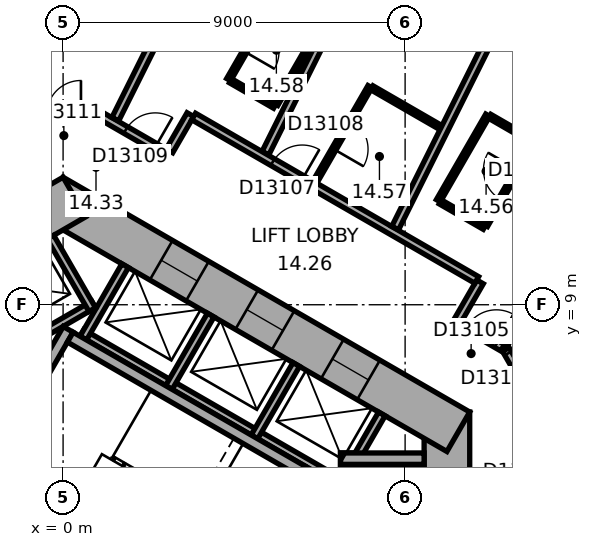
"""IFC4 building model, lengths in metres.
Left out: names, types, materials, properties, quantities, classifications, styles, units other than length and angle.
Written with IfcOpenShell. Run it as: python <this file> out.ifc"""

import sys

from ifc_helpers import new_model, si_unit, direction, frame, frame_2d, origin, place, context, subcontext, project, spatial, rectangle, extrude, element, fill, save


model = new_model("IFC4")
c1 = context("Model", 3, precision=1e-05, world=origin(), true_north=direction((0.0, 1.0)))
c2 = subcontext(c1, "Body", "Model", "MODEL_VIEW")
j1 = project(units=[si_unit("LENGTHUNIT", "METRE"), si_unit("PLANEANGLEUNIT", "RADIAN")], contexts=[c1])
p1 = place(None, origin())
s1 = spatial("IfcSite", under=j1, at=p1, CompositionType="ELEMENT")
p2 = place(p1, origin())
s2 = spatial("IfcBuilding", under=s1, at=p2, CompositionType="ELEMENT")
p3 = place(p2, frame((0.0, 0.0, 67.1)))
s3 = spatial("IfcBuildingStorey", under=s2, at=p3, CompositionType="ELEMENT", Elevation=67.1)
p4 = place(p3, frame((10.1, -6.177, 0.0), z_axis=(0.0, 0.0, 1.0), x_axis=(0.0, 1.0, 0.0)))
e1 = element("IfcWall", 1, at=p4, inside=s3, PredefinedType="SHEAR", context=c2, shape_type="SweptSolid", body=[
    extrude(rectangle(XDim=12.355, YDim=1.2, at=frame_2d((6.177, 0.0))), origin(), (0.0, 0.0, 1.0), 3.3),
])
p5 = place(p4, frame((6.378, 0.0, 0.0)))
e2 = element("IfcOpeningElement", 2, at=p5, cuts=e1, PredefinedType="OPENING", context=c2, shape_type="SweptSolid", body=[
    extrude(rectangle(XDim=1.5, YDim=2.1, at=frame_2d((0.75, 1.05))), frame((0.0, 0.61, 0.0), z_axis=(0.0, -1.0, 0.0), x_axis=(1.0, 0.0, 0.0)), (0.0, 0.0, 1.0), 1.22),
])
p6 = place(p4, frame((1.828, 0.0, 0.0)))
e3 = element("IfcOpeningElement", 3, at=p6, cuts=e1, PredefinedType="OPENING", context=c2, shape_type="SweptSolid", body=[
    extrude(rectangle(XDim=1.1, YDim=2.1, at=frame_2d((0.55, 1.05))), frame((0.0, 0.61, 0.0), z_axis=(0.0, -1.0, 0.0), x_axis=(1.0, 0.0, 0.0)), (0.0, 0.0, 1.0), 1.22),
])
p7 = place(p4, frame((4.427, 0.0, 0.0)))
e4 = element("IfcOpeningElement", 4, at=p7, cuts=e1, PredefinedType="OPENING", context=c2, shape_type="SweptSolid", body=[
    extrude(rectangle(XDim=1.1, YDim=2.1, at=frame_2d((0.55, 1.05))), frame((0.0, 0.61, 0.0), z_axis=(0.0, -1.0, 0.0), x_axis=(1.0, 0.0, 0.0)), (0.0, 0.0, 1.0), 1.22),
])
p8 = place(p3, frame((10.4, 5.658, 0.0), z_axis=(0.0, 0.0, 1.0), x_axis=(-0.866021384402, 0.500006961711, 0.0)))
e5 = element("IfcWall", 5, at=p8, inside=s3, PredefinedType="SHEAR", context=c2, shape_type="SweptSolid", body=[
    extrude(rectangle(XDim=12.355, YDim=1.2, at=frame_2d((6.178, 0.0))), origin(), (0.0, 0.0, 1.0), 3.3),
])
p9 = place(p8, frame((2.728, 0.0, 0.0)))
e6 = element("IfcOpeningElement", 6, at=p9, cuts=e5, PredefinedType="OPENING", context=c2, shape_type="SweptSolid", body=[
    extrude(rectangle(XDim=1.1, YDim=2.1, at=frame_2d((0.55, 1.05))), frame((0.0, 0.61, 0.0), z_axis=(0.0, -1.0, 0.0), x_axis=(1.0, 0.0, 0.0)), (0.0, 0.0, 1.0), 1.22),
])
p10 = place(p8, frame((5.328, 0.0, 0.0)))
e7 = element("IfcOpeningElement", 7, at=p10, cuts=e5, PredefinedType="OPENING", context=c2, shape_type="SweptSolid", body=[
    extrude(rectangle(XDim=1.1, YDim=2.1, at=frame_2d((0.55, 1.05))), frame((0.0, 0.61, 0.0), z_axis=(0.0, -1.0, 0.0), x_axis=(1.0, 0.0, 0.0)), (0.0, 0.0, 1.0), 1.22),
])
p11 = place(p8, frame((7.928, 0.0, 0.0)))
e8 = element("IfcOpeningElement", 8, at=p11, cuts=e5, PredefinedType="OPENING", context=c2, shape_type="SweptSolid", body=[
    extrude(rectangle(XDim=1.1, YDim=2.1, at=frame_2d((0.55, 1.05))), frame((0.0, 0.61, 0.0), z_axis=(0.0, -1.0, 0.0), x_axis=(1.0, 0.0, 0.0)), (0.0, 0.0, 1.0), 1.22),
])
p12 = place(p3, frame((0.3, 11.836, 0.0), z_axis=(0.0, 0.0, 1.0), x_axis=(-0.866021384402, -0.500006961711, 0.0)))
e9 = element("IfcWall", 9, at=p12, inside=s3, PredefinedType="SHEAR", context=c2, shape_type="SweptSolid", body=[
    extrude(rectangle(XDim=12.355, YDim=1.2, at=frame_2d((6.178, 0.0))), origin(), (0.0, 0.0, 1.0), 3.3),
])
p13 = place(p12, frame((6.378, 0.0, 0.0)))
e10 = element("IfcOpeningElement", 10, at=p13, cuts=e9, PredefinedType="OPENING", context=c2, shape_type="SweptSolid", body=[
    extrude(rectangle(XDim=1.5, YDim=2.1, at=frame_2d((0.75, 1.05))), frame((0.0, 0.61, 0.0), z_axis=(0.0, -1.0, 0.0), x_axis=(1.0, 0.0, 0.0)), (0.0, 0.0, 1.0), 1.22),
])
p14 = place(p12, frame((1.828, 0.0, 0.0)))
e11 = element("IfcOpeningElement", 11, at=p14, cuts=e9, PredefinedType="OPENING", context=c2, shape_type="SweptSolid", body=[
    extrude(rectangle(XDim=1.1, YDim=2.1, at=frame_2d((0.55, 1.05))), frame((0.0, 0.61, 0.0), z_axis=(0.0, -1.0, 0.0), x_axis=(1.0, 0.0, 0.0)), (0.0, 0.0, 1.0), 1.22),
])
p15 = place(p3, frame((20.63, 15.47, 0.0), z_axis=(0.0, 0.0, 1.0), x_axis=(-0.894934518609, 0.446197498203, 0.0)))
e12 = element("IfcWall", 12, at=p15, inside=s3, PredefinedType="STANDARD", context=c2, shape_type="SweptSolid", body=[
    extrude(rectangle(XDim=21.246, YDim=0.2, at=frame_2d((10.623, 0.0))), origin(), (0.0, 0.0, 1.0), 3.3),
])
p16 = place(p15, frame((1.553, 0.0, 0.8)))
e13 = element("IfcOpeningElement", 13, at=p16, cuts=e12, PredefinedType="OPENING", context=c2, shape_type="SweptSolid", body=[
    extrude(rectangle(XDim=2.4, YDim=1.7, at=frame_2d((1.2, 0.85))), frame((0.0, 0.11, 0.0), z_axis=(0.0, -1.0, 0.0), x_axis=(1.0, 0.0, 0.0)), (0.0, 0.0, 1.0), 0.22),
])
p17 = place(p15, frame((5.488, 0.0, 0.8)))
e14 = element("IfcOpeningElement", 14, at=p17, cuts=e12, PredefinedType="OPENING", context=c2, shape_type="SweptSolid", body=[
    extrude(rectangle(XDim=2.4, YDim=1.7, at=frame_2d((1.2, 0.85))), frame((0.0, 0.11, 0.0), z_axis=(0.0, -1.0, 0.0), x_axis=(1.0, 0.0, 0.0)), (0.0, 0.0, 1.0), 0.22),
])
p18 = place(p15, frame((9.422, 0.0, 0.8)))
e15 = element("IfcOpeningElement", 15, at=p18, cuts=e12, PredefinedType="OPENING", context=c2, shape_type="SweptSolid", body=[
    extrude(rectangle(XDim=2.4, YDim=1.7, at=frame_2d((1.2, 0.85))), frame((0.0, 0.11, 0.0), z_axis=(0.0, -1.0, 0.0), x_axis=(1.0, 0.0, 0.0)), (0.0, 0.0, 1.0), 0.22),
])
p19 = place(p15, frame((13.357, 0.0, 0.8)))
e16 = element("IfcOpeningElement", 16, at=p19, cuts=e12, PredefinedType="OPENING", context=c2, shape_type="SweptSolid", body=[
    extrude(rectangle(XDim=2.4, YDim=1.7, at=frame_2d((1.2, 0.85))), frame((0.0, 0.11, 0.0), z_axis=(0.0, -1.0, 0.0), x_axis=(1.0, 0.0, 0.0)), (0.0, 0.0, 1.0), 0.22),
])
p20 = place(p15, frame((17.292, 0.0, 0.8)))
e17 = element("IfcOpeningElement", 17, at=p20, cuts=e12, PredefinedType="OPENING", context=c2, shape_type="SweptSolid", body=[
    extrude(rectangle(XDim=2.4, YDim=1.7, at=frame_2d((1.2, 0.85))), frame((0.0, 0.11, 0.0), z_axis=(0.0, -1.0, 0.0), x_axis=(1.0, 0.0, 0.0)), (0.0, 0.0, 1.0), 0.22),
])
p21 = place(p3, frame((7.424, 4.259, 0.0), z_axis=(0.0, 0.0, 1.0), x_axis=(-0.866026010844, 0.49999894854, 0.0)))
e18 = element("IfcWall", 18, at=p21, inside=s3, PredefinedType="PARTITIONING", context=c2, shape_type="SweptSolid", body=[
    extrude(rectangle(XDim=8.0, YDim=0.2, at=frame_2d((4.0, 0.0))), origin(), (0.0, 0.0, 1.0), 3.05),
])
for number, where, z_axis, x_axis in (
    (19, (7.287, 4.222, 0.0), (0.0, 0.0, 1.0), (0.5, 0.866, 0.0)),
    (20, (5.036, 5.522, 0.0), (0.0, 0.0, 1.0), (0.5, 0.866, 0.0)),
    (21, (2.784, 6.822, 0.0), (0.0, 0.0, 1.0), (0.5, 0.866, 0.0)),
    (22, (0.532, 8.122, 0.0), (0.0, 0.0, 1.0), (0.5, 0.866, 0.0)),
):
    element("IfcWall", number, at=place(p3, frame(where, z_axis=z_axis, x_axis=x_axis)), inside=s3, PredefinedType="PARTITIONING", context=c2, shape_type="SweptSolid", body=[
        extrude(rectangle(XDim=2.2, YDim=0.2, at=frame_2d((1.1, 0.0))), origin(), (0.0, 0.0, 1.0), 3.05),
    ])
p22 = place(p3, frame((0.803, 9.009, 0.0), z_axis=(0.0, 0.0, 1.0), x_axis=(-0.866028230842, -0.499995103361, 0.0)))
e23 = element("IfcWall", 23, at=p22, inside=s3, PredefinedType="PARTITIONING", context=c2, shape_type="SweptSolid", body=[
    extrude(rectangle(XDim=5.4, YDim=0.2, at=frame_2d((2.7, 0.0))), origin(), (0.0, 0.0, 1.0), 3.05),
])
p23 = place(p3, frame((0.767, 8.872, 0.0), z_axis=(0.0, 0.0, 1.0), x_axis=(-0.499994660107, 0.866028486751, 0.0)))
e24 = element("IfcWall", 24, at=p23, inside=s3, PredefinedType="PARTITIONING", context=c2, shape_type="SweptSolid", body=[
    extrude(rectangle(XDim=2.2, YDim=0.2, at=frame_2d((1.1, 0.0))), origin(), (0.0, 0.0, 1.0), 3.05),
])
p24 = place(p3, frame((4.158, 0.602, 0.0), z_axis=(0.0, 0.0, 1.0), x_axis=(0.499977259774, 0.866038532462, 0.0)))
e25 = element("IfcWall", 25, at=p24, inside=s3, PredefinedType="SHEAR", context=c2, shape_type="SweptSolid", body=[
    extrude(rectangle(XDim=4.7, YDim=0.3, at=frame_2d((2.35, 0.0))), origin(), (0.0, 0.0, 1.0), 3.05),
])
p25 = place(p24, frame((0.8, 0.0, 0.0)))
e26 = element("IfcOpeningElement", 26, at=p25, cuts=e25, PredefinedType="OPENING", context=c2, shape_type="SweptSolid", body=[
    extrude(rectangle(XDim=1.2, YDim=2.1, at=frame_2d((0.6, 1.05))), frame((0.0, 0.16, 0.0), z_axis=(0.0, -1.0, 0.0), x_axis=(1.0, 0.0, 0.0)), (0.0, 0.0, 1.0), 0.32),
])
p26 = place(p3, frame((-2.216, 4.282, 0.0), z_axis=(0.0, 0.0, 1.0), x_axis=(0.499977259774, 0.866038532462, 0.0)))
e27 = element("IfcWall", 27, at=p26, inside=s3, PredefinedType="SHEAR", context=c2, shape_type="SweptSolid", body=[
    extrude(rectangle(XDim=4.7, YDim=0.3, at=frame_2d((2.35, 0.0))), origin(), (0.0, 0.0, 1.0), 3.05),
])
p27 = place(p3, frame((6.303, 4.617, 0.0), z_axis=(0.0, 0.0, 1.0), x_axis=(-0.866027801685, 0.499995846692, 0.0)))
e28 = element("IfcWall", 28, at=p27, inside=s3, PredefinedType="SHEAR", context=c2, shape_type="SweptSolid", body=[
    extrude(rectangle(XDim=7.06, YDim=0.3, at=frame_2d((3.53, 0.0))), origin(), (0.0, 0.0, 1.0), 3.05),
])
p28 = place(p3, frame((7.45, 1.75, 0.0), z_axis=(0.0, 0.0, 1.0), x_axis=(0.0, 1.0, 0.0)))
e29 = element("IfcWall", 29, at=p28, inside=s3, PredefinedType="SHEAR", context=c2, shape_type="SweptSolid", body=[
    extrude(rectangle(XDim=3.35, YDim=0.3, at=frame_2d((1.675, 0.0))), origin(), (0.0, 0.0, 1.0), 3.05),
])
p29 = place(p3, frame((7.3, 4.95, 0.0), z_axis=(0.0, 0.0, 1.0), x_axis=(1.0, 0.0, 0.0)))
e30 = element("IfcWall", 30, at=p29, inside=s3, PredefinedType="SHEAR", context=c2, shape_type="SweptSolid", body=[
    extrude(rectangle(XDim=2.2, YDim=0.3, at=frame_2d((1.1, 0.0))), origin(), (0.0, 0.0, 1.0), 3.05),
])
p30 = place(p3, frame((0.95, 14.001, 0.0), z_axis=(0.0, 0.0, 1.0), x_axis=(-1.0, 0.0, 0.0)))
e31 = element("IfcWall", 31, at=p30, inside=s3, PredefinedType="PARTITIONING", context=c2, shape_type="SweptSolid", body=[
    extrude(rectangle(XDim=1.86, YDim=0.2, at=frame_2d((0.93, 0.0))), origin(), (0.0, 0.0, 1.0), 3.05),
])
p31 = place(p30, frame((0.48, 0.0, 0.0)))
e32 = element("IfcOpeningElement", 32, at=p31, cuts=e31, PredefinedType="OPENING", context=c2, shape_type="SweptSolid", body=[
    extrude(rectangle(XDim=0.9, YDim=2.1, at=frame_2d((0.45, 1.05))), frame((0.0, 0.11, 0.0), z_axis=(0.0, -1.0, 0.0), x_axis=(1.0, 0.0, 0.0)), (0.0, 0.0, 1.0), 0.22),
])
p32 = place(p3, frame((2.748, 12.962, 0.0), z_axis=(0.0, 0.0, 1.0), x_axis=(-0.866013897511, 0.50001992892, 0.0)))
e33 = element("IfcWall", 33, at=p32, inside=s3, PredefinedType="PARTITIONING", context=c2, shape_type="SweptSolid", body=[
    extrude(rectangle(XDim=2.037, YDim=0.2, at=frame_2d((1.018, 0.0))), origin(), (0.0, 0.0, 1.0), 3.05),
])
p33 = place(p32, frame((0.372, 0.0, 0.0)))
e34 = element("IfcOpeningElement", 34, at=p33, cuts=e33, PredefinedType="OPENING", context=c2, shape_type="SweptSolid", body=[
    extrude(rectangle(XDim=0.9, YDim=2.1, at=frame_2d((0.45, 1.05))), frame((0.0, 0.11, 0.0), z_axis=(0.0, -1.0, 0.0), x_axis=(1.0, 0.0, 0.0)), (0.0, 0.0, 1.0), 0.22),
])
p34 = place(p3, frame((3.349, 14.002, 0.0), z_axis=(0.0, 0.0, 1.0), x_axis=(-0.500074377092, -0.865982457891, 0.0)))
e35 = element("IfcWall", 35, at=p34, inside=s3, PredefinedType="PARTITIONING", context=c2, shape_type="SweptSolid", body=[
    extrude(rectangle(XDim=1.101, YDim=0.2, at=frame_2d((0.55, 0.0))), origin(), (0.0, 0.0, 1.0), 3.05),
])
p35 = place(p3, frame((4.356, 14.922, 0.0), z_axis=(0.0, 0.0, 1.0), x_axis=(0.499936506574, 0.866062058628, 0.0)))
e36 = element("IfcWall", 36, at=p35, inside=s3, PredefinedType="PARTITIONING", context=c2, shape_type="SweptSolid", body=[
    extrude(rectangle(XDim=2.6, YDim=0.12, at=frame_2d((1.3, 0.0))), origin(), (0.0, 0.0, 1.0), 3.05),
])
p36 = place(p35, frame((0.85, 0.0, 0.0)))
e37 = element("IfcOpeningElement", 37, at=p36, cuts=e36, PredefinedType="OPENING", context=c2, shape_type="SweptSolid", body=[
    extrude(rectangle(XDim=0.9, YDim=2.1, at=frame_2d((0.45, 1.05))), frame((0.0, 0.07, 0.0), z_axis=(0.0, -1.0, 0.0), x_axis=(1.0, 0.0, 0.0)), (0.0, 0.0, 1.0), 0.14),
])
p37 = place(p3, frame((5.351, 21.859, 0.0), z_axis=(0.0, 0.0, 1.0), x_axis=(-0.446205309328, -0.894930624086, 0.0)))
e38 = element("IfcWall", 38, at=p37, inside=s3, PredefinedType="PARTITIONING", context=c2, shape_type="SweptSolid", body=[
    extrude(rectangle(XDim=8.913, YDim=0.2, at=frame_2d((4.457, 0.0))), origin(), (0.0, 0.0, 1.0), 2.6),
])
p38 = place(p3, frame((5.569, 14.222, 0.0), z_axis=(0.0, 0.0, 1.0), x_axis=(-0.866036909293, 0.499980071345, 0.0)))
e39 = element("IfcWall", 39, at=p38, inside=s3, PredefinedType="PARTITIONING", context=c2, shape_type="SweptSolid", body=[
    extrude(rectangle(XDim=1.34, YDim=0.12, at=frame_2d((0.67, 0.0))), origin(), (0.0, 0.0, 1.0), 3.05),
])
p39 = place(p3, frame((6.625, 12.227, 0.0), z_axis=(0.0, 0.0, 1.0), x_axis=(0.500023687443, 0.866011727401, 0.0)))
e40 = element("IfcWall", 40, at=p39, inside=s3, PredefinedType="PARTITIONING", context=c2, shape_type="SweptSolid", body=[
    extrude(rectangle(XDim=2.9, YDim=0.12, at=frame_2d((1.45, 0.0))), origin(), (0.0, 0.0, 1.0), 3.05),
])
p40 = place(p39, frame((1.0, 0.0, 0.0)))
e41 = element("IfcOpeningElement", 41, at=p40, cuts=e40, PredefinedType="OPENING", context=c2, shape_type="SweptSolid", body=[
    extrude(rectangle(XDim=0.9, YDim=2.1, at=frame_2d((0.45, 1.05))), frame((0.0, 0.07, 0.0), z_axis=(0.0, -1.0, 0.0), x_axis=(1.0, 0.0, 0.0)), (0.0, 0.0, 1.0), 0.14),
])
p41 = place(p3, frame((6.839, 16.422, 0.0), z_axis=(0.0, 0.0, 1.0), x_axis=(-0.50000366821, -0.866023285932, 0.0)))
e42 = element("IfcWall", 42, at=p41, inside=s3, PredefinedType="PARTITIONING", context=c2, shape_type="SweptSolid", body=[
    extrude(rectangle(XDim=2.48, YDim=0.12, at=frame_2d((1.24, 0.0))), origin(), (0.0, 0.0, 1.0), 3.05),
])
p42 = place(p3, frame((8.127, 14.708, 0.0), z_axis=(0.0, 0.0, 1.0), x_axis=(0.866065472234, -0.499930592986, 0.0)))
e43 = element("IfcWall", 43, at=p42, inside=s3, PredefinedType="PARTITIONING", context=c2, shape_type="SweptSolid", body=[
    extrude(rectangle(XDim=2.098, YDim=0.12, at=frame_2d((1.049, 0.0))), origin(), (0.0, 0.0, 1.0), 3.05),
])
p43 = place(p3, frame((8.872, 20.104, 0.0), z_axis=(0.0, 0.0, 1.0), x_axis=(-0.446218378653, -0.894924107706, 0.0)))
e44 = element("IfcWall", 44, at=p43, inside=s3, PredefinedType="PARTITIONING", context=c2, shape_type="SweptSolid", body=[
    extrude(rectangle(XDim=7.95, YDim=0.2, at=frame_2d((3.975, 0.0))), origin(), (0.0, 0.0, 1.0), 3.05),
])
p44 = place(p3, frame((9.875, 11.736, 0.0), z_axis=(0.0, 0.0, 1.0), x_axis=(0.499936506574, 0.866062058628, 0.0)))
e45 = element("IfcWall", 45, at=p44, inside=s3, PredefinedType="PARTITIONING", context=c2, shape_type="SweptSolid", body=[
    extrude(rectangle(XDim=2.6, YDim=0.12, at=frame_2d((1.3, 0.0))), origin(), (0.0, 0.0, 1.0), 3.05),
])
p45 = place(p3, frame((10.371, 8.561, 0.0), z_axis=(0.0, 0.0, 1.0), x_axis=(0.499986357472, 0.866033280158, 0.0)))
e46 = element("IfcWall", 46, at=p45, inside=s3, PredefinedType="PARTITIONING", context=c2, shape_type="SweptSolid", body=[
    extrude(rectangle(XDim=1.201, YDim=0.2, at=frame_2d((0.601, 0.0))), origin(), (0.0, 0.0, 1.0), 3.05),
])
p46 = place(p3, frame((10.885, 9.652, 0.0), z_axis=(0.0, 0.0, 1.0), x_axis=(-0.866033868542, 0.499985338323, 0.0)))
e47 = element("IfcWall", 47, at=p46, inside=s3, PredefinedType="PARTITIONING", context=c2, shape_type="SweptSolid", body=[
    extrude(rectangle(XDim=8.602, YDim=0.2, at=frame_2d((4.301, 0.0))), origin(), (0.0, 0.0, 1.0), 3.05),
])
p47 = place(p46, frame((5.302, 0.0, 0.0)))
e48 = element("IfcOpeningElement", 48, at=p47, cuts=e47, PredefinedType="OPENING", context=c2, shape_type="SweptSolid", body=[
    extrude(rectangle(XDim=0.9, YDim=2.1, at=frame_2d((0.45, 1.05))), frame((0.0, 0.11, 0.0), z_axis=(0.0, -1.0, 0.0), x_axis=(1.0, 0.0, 0.0)), (0.0, 0.0, 1.0), 0.22),
])
for number, where, z_axis, x_axis in (
    (49, (11.087, 11.036, 0.0), (0.0, 0.0, 1.0), (-0.866, 0.5, 0.0)),
    (50, (11.226, 13.958, 0.0), (0.0, 0.0, 1.0), (0.866, -0.5, 0.0)),
):
    element("IfcWall", number, at=place(p3, frame(where, z_axis=z_axis, x_axis=x_axis)), inside=s3, PredefinedType="PARTITIONING", context=c2, shape_type="SweptSolid", body=[
        extrude(rectangle(XDim=1.34, YDim=0.12, at=frame_2d((0.67, 0.0))), origin(), (0.0, 0.0, 1.0), 3.05),
    ])
p48 = place(p3, frame((11.566, 7.871, 0.0), z_axis=(0.0, 0.0, 1.0), x_axis=(-0.866004557827, 0.500036104519, 0.0)))
e51 = element("IfcWall", 51, at=p48, inside=s3, PredefinedType="PARTITIONING", context=c2, shape_type="SweptSolid", body=[
    extrude(rectangle(XDim=1.28, YDim=0.2, at=frame_2d((0.64, 0.0))), origin(), (0.0, 0.0, 1.0), 3.05),
])
p49 = place(p48, frame((0.19, 0.0, 0.0)))
e52 = element("IfcOpeningElement", 52, at=p49, cuts=e51, PredefinedType="OPENING", context=c2, shape_type="SweptSolid", body=[
    extrude(rectangle(XDim=0.9, YDim=2.1, at=frame_2d((0.45, 1.05))), frame((0.0, 0.11, 0.0), z_axis=(0.0, -1.0, 0.0), x_axis=(1.0, 0.0, 0.0)), (0.0, 0.0, 1.0), 0.22),
])
p50 = place(p3, frame((12.357, 13.236, 0.0), z_axis=(0.0, 0.0, 1.0), x_axis=(-0.50000366821, -0.866023285932, 0.0)))
e53 = element("IfcWall", 53, at=p50, inside=s3, PredefinedType="PARTITIONING", context=c2, shape_type="SweptSolid", body=[
    extrude(rectangle(XDim=2.48, YDim=0.12, at=frame_2d((1.24, 0.0))), origin(), (0.0, 0.0, 1.0), 3.05),
])
p51 = place(p50, frame((0.79, 0.0, 0.0)))
e54 = element("IfcOpeningElement", 54, at=p51, cuts=e53, PredefinedType="OPENING", context=c2, shape_type="SweptSolid", body=[
    extrude(rectangle(XDim=0.9, YDim=2.1, at=frame_2d((0.45, 1.05))), frame((0.0, 0.07, 0.0), z_axis=(0.0, -1.0, 0.0), x_axis=(1.0, 0.0, 0.0)), (0.0, 0.0, 1.0), 0.14),
])
p52 = place(p3, frame((12.393, 18.348, 0.0), z_axis=(0.0, 0.0, 1.0), x_axis=(-0.446176022699, -0.894945225569, 0.0)))
e55 = element("IfcWall", 55, at=p52, inside=s3, PredefinedType="PARTITIONING", context=c2, shape_type="SweptSolid", body=[
    extrude(rectangle(XDim=8.191, YDim=0.2, at=frame_2d((4.095, 0.0))), origin(), (0.0, 0.0, 1.0), 2.6),
])
p53 = place(p3, frame((12.58, 6.212, 0.0), z_axis=(0.0, 0.0, 1.0), x_axis=(-0.500063286585, 0.865988862174, 0.0)))
e56 = element("IfcWall", 56, at=p53, inside=s3, PredefinedType="PARTITIONING", context=c2, shape_type="SweptSolid", body=[
    extrude(rectangle(XDim=1.86, YDim=0.2, at=frame_2d((0.93, 0.0))), origin(), (0.0, 0.0, 1.0), 3.05),
])
p54 = place(p53, frame((0.842, 0.0, 0.0)))
e57 = element("IfcOpeningElement", 57, at=p54, cuts=e56, PredefinedType="OPENING", context=c2, shape_type="SweptSolid", body=[
    extrude(rectangle(XDim=0.9, YDim=2.1, at=frame_2d((0.45, 1.05))), frame((0.0, 0.11, 0.0), z_axis=(0.0, -1.0, 0.0), x_axis=(1.0, 0.0, 0.0)), (0.0, 0.0, 1.0), 0.22),
])
p55 = place(p3, frame((15.915, 16.592, 0.0), z_axis=(0.0, 0.0, 1.0), x_axis=(-0.446199736347, -0.894933402709, 0.0)))
e58 = element("IfcWall", 58, at=p55, inside=s3, PredefinedType="PARTITIONING", context=c2, shape_type="SweptSolid", body=[
    extrude(rectangle(XDim=9.635, YDim=0.2, at=frame_2d((4.817, 0.0))), origin(), (0.0, 0.0, 1.0), 3.05),
])
p56 = place(p9, origin())
e59 = element("IfcDoor", 59, at=p56, inside=s3, OperationType="DOUBLE_DOOR_SLIDING", PredefinedType="DOOR", context=c2, shape_type="SweptSolid", body=[
    extrude(rectangle(XDim=1.1, YDim=2.1, at=frame_2d((0.55, 1.05))), frame((0.0, 0.025, 0.0), z_axis=(0.0, -1.0, 0.0), x_axis=(1.0, 0.0, 0.0)), (0.0, 0.0, 1.0), 0.05),
])
fill(e6, e59)
p57 = place(p10, origin())
e60 = element("IfcDoor", 60, at=p57, inside=s3, OperationType="DOUBLE_DOOR_SLIDING", PredefinedType="DOOR", context=c2, shape_type="SweptSolid", body=[
    extrude(rectangle(XDim=1.1, YDim=2.1, at=frame_2d((0.55, 1.05))), frame((0.0, 0.025, 0.0), z_axis=(0.0, -1.0, 0.0), x_axis=(1.0, 0.0, 0.0)), (0.0, 0.0, 1.0), 0.05),
])
fill(e7, e60)
p58 = place(p11, origin())
e61 = element("IfcDoor", 61, at=p58, inside=s3, OperationType="DOUBLE_DOOR_SLIDING", PredefinedType="DOOR", context=c2, shape_type="SweptSolid", body=[
    extrude(rectangle(XDim=1.1, YDim=2.1, at=frame_2d((0.55, 1.05))), frame((0.0, 0.025, 0.0), z_axis=(0.0, -1.0, 0.0), x_axis=(1.0, 0.0, 0.0)), (0.0, 0.0, 1.0), 0.05),
])
fill(e8, e61)
p59 = place(p54, origin())
e62 = element("IfcDoor", 62, at=p59, inside=s3, OperationType="SINGLE_SWING_LEFT", PredefinedType="DOOR", context=c2, shape_type="SweptSolid", body=[
    extrude(rectangle(XDim=0.9, YDim=2.1, at=frame_2d((0.45, 1.05))), frame((0.0, 0.025, 0.0), z_axis=(0.0, -1.0, 0.0), x_axis=(1.0, 0.0, 0.0)), (0.0, 0.0, 1.0), 0.05),
])
fill(e57, e62)
p60 = place(p49, origin())
e63 = element("IfcDoor", 63, at=p60, inside=s3, OperationType="SINGLE_SWING_LEFT", PredefinedType="DOOR", context=c2, shape_type="SweptSolid", body=[
    extrude(rectangle(XDim=0.9, YDim=2.1, at=frame_2d((0.45, 1.05))), frame((0.0, 0.025, 0.0), z_axis=(0.0, -1.0, 0.0), x_axis=(1.0, 0.0, 0.0)), (0.0, 0.0, 1.0), 0.05),
])
fill(e52, e63)
p61 = place(p51, origin())
e64 = element("IfcDoor", 64, at=p61, inside=s3, OperationType="SINGLE_SWING_LEFT", PredefinedType="DOOR", context=c2, shape_type="SweptSolid", body=[
    extrude(rectangle(XDim=0.9, YDim=2.1, at=frame_2d((0.45, 1.05))), frame((0.0, 0.025, 0.0), z_axis=(0.0, -1.0, 0.0), x_axis=(1.0, 0.0, 0.0)), (0.0, 0.0, 1.0), 0.05),
])
fill(e54, e64)
p62 = place(p47, origin())
e65 = element("IfcDoor", 65, at=p62, inside=s3, OperationType="SINGLE_SWING_LEFT", PredefinedType="DOOR", context=c2, shape_type="SweptSolid", body=[
    extrude(rectangle(XDim=0.9, YDim=2.1, at=frame_2d((0.45, 1.05))), frame((0.0, 0.025, 0.0), z_axis=(0.0, -1.0, 0.0), x_axis=(1.0, 0.0, 0.0)), (0.0, 0.0, 1.0), 0.05),
])
fill(e48, e65)
p63 = place(p40, origin())
e66 = element("IfcDoor", 66, at=p63, inside=s3, OperationType="SINGLE_SWING_LEFT", PredefinedType="DOOR", context=c2, shape_type="SweptSolid", body=[
    extrude(rectangle(XDim=0.9, YDim=2.1, at=frame_2d((0.45, 1.05))), frame((0.0, 0.025, 0.0), z_axis=(0.0, -1.0, 0.0), x_axis=(1.0, 0.0, 0.0)), (0.0, 0.0, 1.0), 0.05),
])
fill(e41, e66)
p64 = place(p33, origin())
e67 = element("IfcDoor", 67, at=p64, inside=s3, OperationType="SINGLE_SWING_LEFT", PredefinedType="DOOR", context=c2, shape_type="SweptSolid", body=[
    extrude(rectangle(XDim=0.9, YDim=2.1, at=frame_2d((0.45, 1.05))), frame((0.0, 0.025, 0.0), z_axis=(0.0, -1.0, 0.0), x_axis=(1.0, 0.0, 0.0)), (0.0, 0.0, 1.0), 0.05),
])
fill(e34, e67)
p65 = place(p36, origin())
e68 = element("IfcDoor", 68, at=p65, inside=s3, OperationType="SINGLE_SWING_LEFT", PredefinedType="DOOR", context=c2, shape_type="SweptSolid", body=[
    extrude(rectangle(XDim=0.9, YDim=2.1, at=frame_2d((0.45, 1.05))), frame((0.0, 0.025, 0.0), z_axis=(0.0, -1.0, 0.0), x_axis=(1.0, 0.0, 0.0)), (0.0, 0.0, 1.0), 0.05),
])
fill(e37, e68)
p66 = place(p31, origin())
e69 = element("IfcDoor", 69, at=p66, inside=s3, OperationType="SINGLE_SWING_LEFT", PredefinedType="DOOR", context=c2, shape_type="SweptSolid", body=[
    extrude(rectangle(XDim=0.9, YDim=2.1, at=frame_2d((0.45, 1.05))), frame((0.0, 0.025, 0.0), z_axis=(0.0, -1.0, 0.0), x_axis=(1.0, 0.0, 0.0)), (0.0, 0.0, 1.0), 0.05),
])
fill(e32, e69)
save(model, sys.argv[1])
